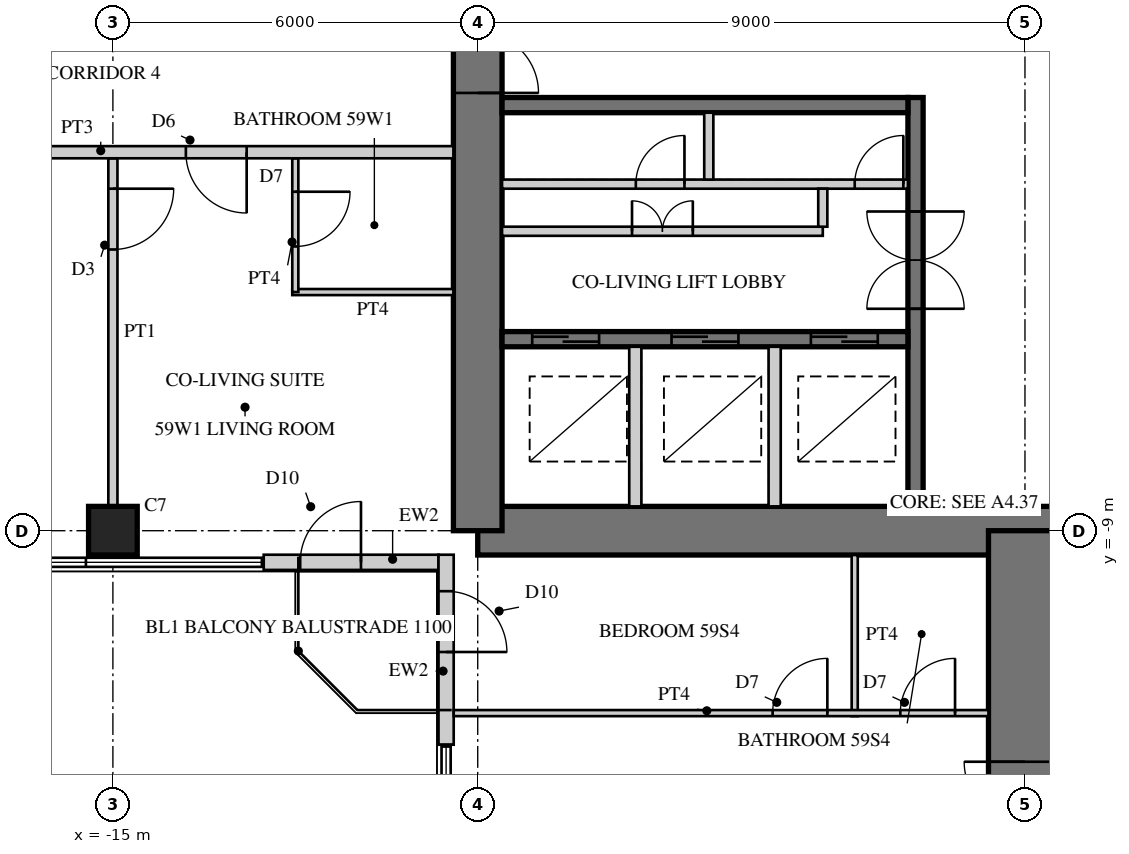
"""IFC4 building model, lengths in metres.
Left out: names, types, materials, properties, quantities, classifications, styles, units other than length and angle.
Written with IfcOpenShell. Run it as: python <this file> out.ifc"""

import sys

from ifc_helpers import new_model, si_unit, direction, frame, frame_2d, origin, origin_2d, place, context, subcontext, project, spatial, rectangle, hollow_rectangle, extrude, element, fill, save


model = new_model("IFC4")
c1 = context("Model", 3, precision=1e-05, world=origin(), true_north=direction((0.0, 1.0)))
c2 = subcontext(c1, "Body", "Model", "MODEL_VIEW")
j1 = project(units=[si_unit("LENGTHUNIT", "METRE"), si_unit("PLANEANGLEUNIT", "RADIAN")], contexts=[c1])
p1 = place(None, origin())
s1 = spatial("IfcSite", under=j1, at=p1, CompositionType="ELEMENT")
p2 = place(p1, origin())
s2 = spatial("IfcBuilding", under=s1, at=p2, CompositionType="ELEMENT")
p3 = place(p2, frame((0.0, 0.0, 232.3)))
s3 = spatial("IfcBuildingStorey", under=s2, at=p3, CompositionType="ELEMENT", Elevation=232.3)
p4 = place(p3, frame((-9.0, -9.0, 0.0), z_axis=(0.0, 0.0, 1.0), x_axis=(1.0, 0.0, 0.0)))
e1 = element("IfcWall", 1, at=p4, inside=s3, PredefinedType="SHEAR", context=c2, shape_type="SweptSolid", body=[
    extrude(rectangle(XDim=18.0, YDim=0.8, at=frame_2d((9.0, 0.0))), origin(), (0.0, 0.0, 1.0), 3.4),
])
p5 = place(p4, frame((9.8, 0.0, 0.0)))
e2 = element("IfcOpeningElement", 2, at=p5, cuts=e1, PredefinedType="OPENING", context=c2, shape_type="SweptSolid", body=[
    extrude(rectangle(XDim=1.0, YDim=2.4, at=frame_2d((0.5, 1.2))), frame((0.0, 0.41, 0.0), z_axis=(0.0, -1.0, 0.0), x_axis=(1.0, 0.0, 0.0)), (0.0, 0.0, 1.0), 0.82),
])
p6 = place(p3, frame((-9.0, 9.0, 0.0), z_axis=(0.0, 0.0, 1.0), x_axis=(0.0, -1.0, 0.0)))
e3 = element("IfcWall", 3, at=p6, inside=s3, PredefinedType="SHEAR", context=c2, shape_type="SweptSolid", body=[
    extrude(rectangle(XDim=18.0, YDim=0.8, at=frame_2d((9.0, 0.0))), origin(), (0.0, 0.0, 1.0), 3.4),
])
p7 = place(p6, frame((9.8, 0.0, 0.0)))
e4 = element("IfcOpeningElement", 4, at=p7, cuts=e3, PredefinedType="OPENING", context=c2, shape_type="SweptSolid", body=[
    extrude(rectangle(XDim=1.0, YDim=2.4, at=frame_2d((0.5, 1.2))), frame((0.0, 0.41, 0.0), z_axis=(0.0, -1.0, 0.0), x_axis=(1.0, 0.0, 0.0)), (0.0, 0.0, 1.0), 0.82),
])
p8 = place(p3, frame((-1.8, -1.875, 0.0), z_axis=(0.0, 0.0, 1.0), x_axis=(0.0, -1.0, 0.0)))
e5 = element("IfcWall", 5, at=p8, inside=s3, PredefinedType="SHEAR", context=c2, shape_type="SweptSolid", body=[
    extrude(rectangle(XDim=6.725, YDim=0.25, at=frame_2d((3.363, 0.0))), origin(), (0.0, 0.0, 1.0), 3.4),
])
p9 = place(p8, frame((1.875, 0.0, 0.0)))
e6 = element("IfcOpeningElement", 6, at=p9, cuts=e5, PredefinedType="OPENING", context=c2, shape_type="SweptSolid", body=[
    extrude(rectangle(XDim=1.6, YDim=2.4, at=frame_2d((0.8, 1.2))), frame((0.0, 0.135, 0.0), z_axis=(0.0, -1.0, 0.0), x_axis=(1.0, 0.0, 0.0)), (0.0, 0.0, 1.0), 0.27),
])
p10 = place(p3, frame((-1.925, -2.0, 0.0), z_axis=(0.0, 0.0, 1.0), x_axis=(-1.0, 0.0, 0.0)))
e7 = element("IfcWall", 7, at=p10, inside=s3, PredefinedType="SHEAR", context=c2, shape_type="SweptSolid", body=[
    extrude(rectangle(XDim=6.675, YDim=0.25, at=frame_2d((3.337, 0.0))), origin(), (0.0, 0.0, 1.0), 3.4),
])
p11 = place(p3, frame((-1.925, -5.85, 0.0), z_axis=(0.0, 0.0, 1.0), x_axis=(-1.0, 0.0, 0.0)))
e8 = element("IfcWall", 8, at=p11, inside=s3, PredefinedType="SHEAR", context=c2, shape_type="SweptSolid", body=[
    extrude(rectangle(XDim=6.675, YDim=0.25, at=frame_2d((3.337, 0.0))), origin(), (0.0, 0.0, 1.0), 3.4),
])
p12 = place(p11, frame((0.496, 0.0, 0.0)))
e9 = element("IfcOpeningElement", 9, at=p12, cuts=e8, PredefinedType="OPENING", context=c2, shape_type="SweptSolid", body=[
    extrude(rectangle(XDim=1.1, YDim=2.2, at=frame_2d((0.55, 1.1))), frame((0.0, 0.135, 0.0), z_axis=(0.0, -1.0, 0.0), x_axis=(1.0, 0.0, 0.0)), (0.0, 0.0, 1.0), 0.27),
])
p13 = place(p11, frame((2.788, 0.0, 0.0)))
e10 = element("IfcOpeningElement", 10, at=p13, cuts=e8, PredefinedType="OPENING", context=c2, shape_type="SweptSolid", body=[
    extrude(rectangle(XDim=1.1, YDim=2.2, at=frame_2d((0.55, 1.1))), frame((0.0, 0.135, 0.0), z_axis=(0.0, -1.0, 0.0), x_axis=(1.0, 0.0, 0.0)), (0.0, 0.0, 1.0), 0.27),
])
p14 = place(p11, frame((5.079, 0.0, 0.0)))
e11 = element("IfcOpeningElement", 11, at=p14, cuts=e8, PredefinedType="OPENING", context=c2, shape_type="SweptSolid", body=[
    extrude(rectangle(XDim=1.1, YDim=2.2, at=frame_2d((0.55, 1.1))), frame((0.0, 0.135, 0.0), z_axis=(0.0, -1.0, 0.0), x_axis=(1.0, 0.0, 0.0)), (0.0, 0.0, 1.0), 0.27),
])
p15 = place(p3, frame((-1.925, -3.3, 0.0), z_axis=(0.0, 0.0, 1.0), x_axis=(-1.0, 0.0, 0.0)))
e12 = element("IfcWall", 12, at=p15, inside=s3, PredefinedType="PARTITIONING", context=c2, shape_type="SweptSolid", body=[
    extrude(rectangle(XDim=6.675, YDim=0.15, at=frame_2d((3.337, 0.0))), origin(), (0.0, 0.0, 1.0), 3.4),
])
p16 = place(p15, frame((0.075, 0.0, 0.0)))
e13 = element("IfcOpeningElement", 13, at=p16, cuts=e12, PredefinedType="OPENING", context=c2, shape_type="SweptSolid", body=[
    extrude(rectangle(XDim=0.8, YDim=2.1, at=frame_2d((0.4, 1.05))), frame((0.0, 0.085, 0.0), z_axis=(0.0, -1.0, 0.0), x_axis=(1.0, 0.0, 0.0)), (0.0, 0.0, 1.0), 0.17),
])
p17 = place(p15, frame((3.675, 0.0, 0.0)))
e14 = element("IfcOpeningElement", 14, at=p17, cuts=e12, PredefinedType="OPENING", context=c2, shape_type="SweptSolid", body=[
    extrude(rectangle(XDim=0.8, YDim=2.1, at=frame_2d((0.4, 1.05))), frame((0.0, 0.085, 0.0), z_axis=(0.0, -1.0, 0.0), x_axis=(1.0, 0.0, 0.0)), (0.0, 0.0, 1.0), 0.17),
])
p18 = place(p3, frame((-5.2, -2.125, 0.0), z_axis=(0.0, 0.0, 1.0), x_axis=(0.0, -1.0, 0.0)))
e15 = element("IfcWall", 15, at=p18, inside=s3, PredefinedType="PARTITIONING", context=c2, shape_type="SweptSolid", body=[
    extrude(rectangle(XDim=1.1, YDim=0.15, at=frame_2d((0.55, 0.0))), origin(), (0.0, 0.0, 1.0), 3.4),
])
for number, where, z_axis, x_axis in (
    (16, (-4.117, -5.975, 0.0), (0.0, 0.0, 1.0), (0.0, -1.0, 0.0)),
    (17, (-6.408, -5.975, 0.0), (0.0, 0.0, 1.0), (0.0, -1.0, 0.0)),
):
    element("IfcWall", number, at=place(p3, frame(where, z_axis=z_axis, x_axis=x_axis)), inside=s3, PredefinedType="PARTITIONING", context=c2, shape_type="SweptSolid", body=[
        extrude(rectangle(XDim=2.625, YDim=0.2, at=frame_2d((1.312, 0.0))), origin(), (0.0, 0.0, 1.0), 3.4),
    ])
p19 = place(p3, frame((0.0, -9.0, 0.0), z_axis=(0.0, 0.0, 1.0), x_axis=(0.0, -1.0, 0.0)))
e18 = element("IfcWall", 18, at=p19, inside=s3, PredefinedType="SHEAR", context=c2, shape_type="SweptSolid", body=[
    extrude(rectangle(XDim=9.0, YDim=1.2, at=frame_2d((4.5, 0.0))), origin(), (0.0, 0.0, 1.0), 3.4),
])
p20 = place(p19, frame((3.8, 0.0, 0.0)))
e19 = element("IfcOpeningElement", 19, at=p20, cuts=e18, PredefinedType="OPENING", context=c2, shape_type="SweptSolid", body=[
    extrude(rectangle(XDim=1.0, YDim=2.15, at=frame_2d((0.5, 1.075))), frame((0.0, 0.61, 0.0), z_axis=(0.0, -1.0, 0.0), x_axis=(1.0, 0.0, 0.0)), (0.0, 0.0, 1.0), 1.22),
])
p21 = place(p19, frame((7.0, 0.0, 0.0)))
e20 = element("IfcOpeningElement", 20, at=p21, cuts=e18, PredefinedType="OPENING", context=c2, shape_type="SweptSolid", body=[
    extrude(rectangle(XDim=1.0, YDim=2.2, at=frame_2d((0.5, 1.1))), frame((0.0, 0.61, 0.0), z_axis=(0.0, -1.0, 0.0), x_axis=(1.0, 0.0, 0.0)), (0.0, 0.0, 1.0), 1.22),
])
p22 = place(p3, frame((-15.0, -9.0, 0.0), z_axis=(0.0, 0.0, 1.0), x_axis=(1.0, 0.0, 0.0)))
e21 = element("IfcColumn", 21, at=p22, inside=s3, PredefinedType="COLUMN", context=c2, shape_type="SweptSolid", body=[
    extrude(rectangle(XDim=0.8, YDim=0.8, at=origin_2d()), origin(), (0.0, 0.0, 1.0), 3.4),
])
p23 = place(p3, frame((-12.52, -9.52, 0.0), z_axis=(0.0, 0.0, 1.0), x_axis=(1.0, 0.0, 0.0)))
e22 = element("IfcWall", 22, at=p23, inside=s3, PredefinedType="SOLIDWALL", context=c2, shape_type="SweptSolid", body=[
    extrude(rectangle(XDim=2.875, YDim=0.25, at=frame_2d((1.438, 0.0))), origin(), (0.0, 0.0, 1.0), 3.22),
])
p24 = place(p23, frame((0.6, 0.0, 0.0)))
e23 = element("IfcOpeningElement", 23, at=p24, cuts=e22, PredefinedType="OPENING", context=c2, shape_type="SweptSolid", body=[
    extrude(rectangle(XDim=1.0, YDim=2.2, at=frame_2d((0.5, 1.1))), frame((0.0, 0.135, 0.0), z_axis=(0.0, -1.0, 0.0), x_axis=(1.0, 0.0, 0.0)), (0.0, 0.0, 1.0), 0.27),
])
p25 = place(p3, frame((-9.52, -9.395, 0.0), z_axis=(0.0, 0.0, 1.0), x_axis=(0.0, -1.0, 0.0)))
e24 = element("IfcWall", 24, at=p25, inside=s3, PredefinedType="SOLIDWALL", context=c2, shape_type="SweptSolid", body=[
    extrude(rectangle(XDim=3.125, YDim=0.25, at=frame_2d((1.562, 0.0))), origin(), (0.0, 0.0, 1.0), 3.22),
])
p26 = place(p25, frame((0.6, 0.0, 0.0)))
e25 = element("IfcOpeningElement", 25, at=p26, cuts=e24, PredefinedType="OPENING", context=c2, shape_type="SweptSolid", body=[
    extrude(rectangle(XDim=1.0, YDim=2.2, at=frame_2d((0.5, 1.1))), frame((0.0, 0.135, 0.0), z_axis=(0.0, -1.0, 0.0), x_axis=(1.0, 0.0, 0.0)), (0.0, 0.0, 1.0), 0.27),
])
p27 = place(p3, frame((-3.325, -4.075, 0.0), z_axis=(0.0, 0.0, 1.0), x_axis=(-1.0, 0.0, 0.0)))
e26 = element("IfcWall", 26, at=p27, inside=s3, PredefinedType="PARTITIONING", context=c2, shape_type="SweptSolid", body=[
    extrude(rectangle(XDim=5.275, YDim=0.15, at=frame_2d((2.638, 0.0))), origin(), (0.0, 0.0, 1.0), 3.22),
])
p28 = place(p27, frame((2.137, 0.0, 0.0)))
e27 = element("IfcOpeningElement", 27, at=p28, cuts=e26, PredefinedType="OPENING", context=c2, shape_type="SweptSolid", body=[
    extrude(rectangle(XDim=1.0, YDim=2.1, at=frame_2d((0.5, 1.05))), frame((0.0, 0.085, 0.0), z_axis=(0.0, -1.0, 0.0), x_axis=(1.0, 0.0, 0.0)), (0.0, 0.0, 1.0), 0.17),
])
p29 = place(p3, frame((-3.325, -3.375, 0.0), z_axis=(0.0, 0.0, 1.0), x_axis=(0.0, -1.0, 0.0)))
e28 = element("IfcWall", 28, at=p29, inside=s3, PredefinedType="PARTITIONING", context=c2, shape_type="SweptSolid", body=[
    extrude(rectangle(XDim=0.625, YDim=0.15, at=frame_2d((0.312, 0.0))), origin(), (0.0, 0.0, 1.0), 3.22),
])
p30 = place(p3, frame((-2.8, -9.4, 0.0), z_axis=(0.0, 0.0, 1.0), x_axis=(0.0, -1.0, 0.0)))
e29 = element("IfcWall", 29, at=p30, inside=s3, PredefinedType="PARTITIONING", context=c2, shape_type="SweptSolid", body=[
    extrude(rectangle(XDim=2.65, YDim=0.1, at=frame_2d((1.325, 0.0))), origin(), (0.0, 0.0, 1.0), 3.22),
])
p31 = place(p3, frame((-9.395, -12.0, 0.0), z_axis=(0.0, 0.0, 1.0), x_axis=(1.0, 0.0, 0.0)))
e30 = element("IfcWall", 30, at=p31, inside=s3, PredefinedType="PARTITIONING", context=c2, shape_type="SweptSolid", body=[
    extrude(rectangle(XDim=8.795, YDim=0.1, at=frame_2d((4.397, 0.0))), origin(), (0.0, 0.0, 1.0), 3.22),
])
p32 = place(p31, frame((5.245, 0.0, 0.0)))
e31 = element("IfcOpeningElement", 31, at=p32, cuts=e30, PredefinedType="OPENING", context=c2, shape_type="SweptSolid", body=[
    extrude(rectangle(XDim=0.9, YDim=2.1, at=frame_2d((0.45, 1.05))), frame((0.0, 0.06, 0.0), z_axis=(0.0, -1.0, 0.0), x_axis=(1.0, 0.0, 0.0)), (0.0, 0.0, 1.0), 0.12),
])
p33 = place(p31, frame((7.345, 0.0, 0.0)))
e32 = element("IfcOpeningElement", 32, at=p33, cuts=e30, PredefinedType="OPENING", context=c2, shape_type="SweptSolid", body=[
    extrude(rectangle(XDim=0.9, YDim=2.1, at=frame_2d((0.45, 1.05))), frame((0.0, 0.06, 0.0), z_axis=(0.0, -1.0, 0.0), x_axis=(1.0, 0.0, 0.0)), (0.0, 0.0, 1.0), 0.12),
])
p34 = place(p3, frame((-9.4, -5.075, 0.0), z_axis=(0.0, 0.0, 1.0), x_axis=(-1.0, 0.0, 0.0)))
e33 = element("IfcWall", 33, at=p34, inside=s3, PredefinedType="PARTITIONING", context=c2, shape_type="SweptSolid", body=[
    extrude(rectangle(XDim=2.65, YDim=0.1, at=frame_2d((1.325, 0.0))), origin(), (0.0, 0.0, 1.0), 3.22),
])
p35 = place(p3, frame((-12.0, -2.875, 0.0), z_axis=(0.0, 0.0, 1.0), x_axis=(0.0, -1.0, 0.0)))
e34 = element("IfcWall", 34, at=p35, inside=s3, PredefinedType="PARTITIONING", context=c2, shape_type="SweptSolid", body=[
    extrude(rectangle(XDim=2.2, YDim=0.1, at=frame_2d((1.1, 0.0))), origin(), (0.0, 0.0, 1.0), 3.22),
])
p36 = place(p35, frame((0.55, 0.0, 0.0)))
e35 = element("IfcOpeningElement", 35, at=p36, cuts=e34, PredefinedType="OPENING", context=c2, shape_type="SweptSolid", body=[
    extrude(rectangle(XDim=0.9, YDim=2.1, at=frame_2d((0.45, 1.05))), frame((0.0, 0.06, 0.0), z_axis=(0.0, -1.0, 0.0), x_axis=(1.0, 0.0, 0.0)), (0.0, 0.0, 1.0), 0.12),
])
p37 = place(p3, frame((-15.0, -2.875, 0.0), z_axis=(0.0, 0.0, 1.0), x_axis=(0.0, -1.0, 0.0)))
e36 = element("IfcWall", 36, at=p37, inside=s3, PredefinedType="PARTITIONING", context=c2, shape_type="SweptSolid", body=[
    extrude(rectangle(XDim=5.725, YDim=0.15, at=frame_2d((2.863, 0.0))), origin(), (0.0, 0.0, 1.0), 2.52),
])
p38 = place(p37, frame((0.5, 0.0, 0.0)))
e37 = element("IfcOpeningElement", 37, at=p38, cuts=e36, PredefinedType="OPENING", context=c2, shape_type="SweptSolid", body=[
    extrude(rectangle(XDim=1.0, YDim=2.1, at=frame_2d((0.5, 1.05))), frame((0.0, 0.085, 0.0), z_axis=(0.0, -1.0, 0.0), x_axis=(1.0, 0.0, 0.0)), (0.0, 0.0, 1.0), 0.17),
])
p39 = place(p3, frame((-9.4, -2.775, 0.0), z_axis=(0.0, 0.0, 1.0), x_axis=(-1.0, 0.0, 0.0)))
e38 = element("IfcWall", 38, at=p39, inside=s3, PredefinedType="SOLIDWALL", context=c2, shape_type="SweptSolid", body=[
    extrude(rectangle(XDim=11.6, YDim=0.2, at=frame_2d((5.8, 0.0))), origin(), (0.0, 0.0, 1.0), 3.22),
])
p40 = place(p39, frame((3.4, 0.0, 0.0)))
e39 = element("IfcOpeningElement", 39, at=p40, cuts=e38, PredefinedType="OPENING", context=c2, shape_type="SweptSolid", body=[
    extrude(rectangle(XDim=1.0, YDim=2.15, at=frame_2d((0.5, 1.075))), frame((0.0, 0.11, 0.0), z_axis=(0.0, -1.0, 0.0), x_axis=(1.0, 0.0, 0.0)), (0.0, 0.0, 1.0), 0.22),
])
p41 = place(p24, origin())
e40 = element("IfcDoor", 40, at=p41, inside=s3, OperationType="SINGLE_SWING_RIGHT", PredefinedType="DOOR", context=c2, shape_type="SweptSolid", body=[
    extrude(hollow_rectangle(XDim=1.0, YDim=2.2, WallThickness=0.06, at=frame_2d((0.5, 1.1))), frame((0.0, 0.025, 0.0), z_axis=(0.0, -1.0, 0.0), x_axis=(1.0, 0.0, 0.0)), (0.0, 0.0, 1.0), 0.05),
    extrude(rectangle(XDim=0.879, YDim=2.079, at=frame_2d((0.5, 1.1))), frame((0.0, 0.025, 0.0), z_axis=(0.0, -1.0, 0.0), x_axis=(1.0, 0.0, 0.0)), (0.0, 0.0, 1.0), 0.05),
])
fill(e23, e40)
p42 = place(p26, origin())
e41 = element("IfcDoor", 41, at=p42, inside=s3, OperationType="SINGLE_SWING_RIGHT", PredefinedType="DOOR", context=c2, shape_type="SweptSolid", body=[
    extrude(hollow_rectangle(XDim=1.0, YDim=2.2, WallThickness=0.06, at=frame_2d((0.5, 1.1))), frame((0.0, 0.025, 0.0), z_axis=(0.0, -1.0, 0.0), x_axis=(1.0, 0.0, 0.0)), (0.0, 0.0, 1.0), 0.05),
    extrude(rectangle(XDim=0.879, YDim=2.079, at=frame_2d((0.5, 1.1))), frame((0.0, 0.025, 0.0), z_axis=(0.0, -1.0, 0.0), x_axis=(1.0, 0.0, 0.0)), (0.0, 0.0, 1.0), 0.05),
])
fill(e25, e41)
p43 = place(p28, frame((1.0, 0.0, 0.0), z_axis=(0.0, 0.0, 1.0), x_axis=(-1.0, 0.0, 0.0)))
e42 = element("IfcDoor", 42, at=p43, inside=s3, OperationType="DOUBLE_DOOR_SINGLE_SWING", PredefinedType="DOOR", context=c2, shape_type="SweptSolid", body=[
    extrude(rectangle(XDim=1.0, YDim=2.1, at=frame_2d((0.5, 1.05))), frame((0.0, 0.025, 0.0), z_axis=(0.0, -1.0, 0.0), x_axis=(1.0, 0.0, 0.0)), (0.0, 0.0, 1.0), 0.05),
])
fill(e27, e42)
p44 = place(p32, origin())
e43 = element("IfcDoor", 43, at=p44, inside=s3, OperationType="SINGLE_SWING_RIGHT", PredefinedType="DOOR", context=c2, shape_type="SweptSolid", body=[
    extrude(rectangle(XDim=0.9, YDim=2.1, at=frame_2d((0.45, 1.05))), frame((0.0, 0.025, 0.0), z_axis=(0.0, -1.0, 0.0), x_axis=(1.0, 0.0, 0.0)), (0.0, 0.0, 1.0), 0.05),
])
fill(e31, e43)
p45 = place(p33, origin())
e44 = element("IfcDoor", 44, at=p45, inside=s3, OperationType="SINGLE_SWING_RIGHT", PredefinedType="DOOR", context=c2, shape_type="SweptSolid", body=[
    extrude(rectangle(XDim=0.9, YDim=2.1, at=frame_2d((0.45, 1.05))), frame((0.0, 0.025, 0.0), z_axis=(0.0, -1.0, 0.0), x_axis=(1.0, 0.0, 0.0)), (0.0, 0.0, 1.0), 0.05),
])
fill(e32, e44)
p46 = place(p36, origin())
e45 = element("IfcDoor", 45, at=p46, inside=s3, OperationType="SINGLE_SWING_LEFT", PredefinedType="DOOR", context=c2, shape_type="SweptSolid", body=[
    extrude(rectangle(XDim=0.9, YDim=2.1, at=frame_2d((0.45, 1.05))), frame((0.0, 0.025, 0.0), z_axis=(0.0, -1.0, 0.0), x_axis=(1.0, 0.0, 0.0)), (0.0, 0.0, 1.0), 0.05),
])
fill(e35, e45)
p47 = place(p38, origin())
e46 = element("IfcDoor", 46, at=p47, inside=s3, OperationType="SINGLE_SWING_LEFT", PredefinedType="DOOR", context=c2, shape_type="SweptSolid", body=[
    extrude(rectangle(XDim=1.0, YDim=2.1, at=frame_2d((0.5, 1.05))), frame((0.0, 0.025, 0.0), z_axis=(0.0, -1.0, 0.0), x_axis=(1.0, 0.0, 0.0)), (0.0, 0.0, 1.0), 0.05),
])
fill(e37, e46)
p48 = place(p40, origin())
e47 = element("IfcDoor", 47, at=p48, inside=s3, OperationType="SINGLE_SWING_LEFT", PredefinedType="DOOR", context=c2, shape_type="SweptSolid", body=[
    extrude(rectangle(XDim=1.0, YDim=2.15, at=frame_2d((0.5, 1.075))), frame((0.0, 0.025, 0.0), z_axis=(0.0, -1.0, 0.0), x_axis=(1.0, 0.0, 0.0)), (0.0, 0.0, 1.0), 0.05),
])
fill(e39, e47)
p49 = place(p20, frame((1.0, 0.0, 0.0), z_axis=(0.0, 0.0, 1.0), x_axis=(-1.0, 0.0, 0.0)))
e48 = element("IfcDoor", 48, at=p49, inside=s3, OperationType="SINGLE_SWING_RIGHT", PredefinedType="DOOR", context=c2, shape_type="SweptSolid", body=[
    extrude(rectangle(XDim=1.0, YDim=2.15, at=frame_2d((0.5, 1.075))), frame((0.0, 0.025, 0.0), z_axis=(0.0, -1.0, 0.0), x_axis=(1.0, 0.0, 0.0)), (0.0, 0.0, 1.0), 0.05),
])
fill(e19, e48)
p50 = place(p7, origin())
e49 = element("IfcDoor", 49, at=p50, inside=s3, OperationType="SINGLE_SWING_RIGHT", PredefinedType="DOOR", context=c2, shape_type="SweptSolid", body=[
    extrude(rectangle(XDim=1.0, YDim=2.4, at=frame_2d((0.5, 1.2))), frame((0.0, 0.055, 0.0), z_axis=(0.0, -1.0, 0.0), x_axis=(1.0, 0.0, 0.0)), (0.0, 0.0, 1.0), 0.05),
])
fill(e4, e49)
p51 = place(p12, origin())
e50 = element("IfcDoor", 50, at=p51, inside=s3, OperationType="DOUBLE_DOOR_SLIDING", PredefinedType="DOOR", context=c2, shape_type="SweptSolid", body=[
    extrude(rectangle(XDim=1.1, YDim=2.2, at=frame_2d((0.55, 1.1))), frame((0.0, 0.025, 0.0), z_axis=(0.0, -1.0, 0.0), x_axis=(1.0, 0.0, 0.0)), (0.0, 0.0, 1.0), 0.05),
])
fill(e9, e50)
p52 = place(p13, origin())
e51 = element("IfcDoor", 51, at=p52, inside=s3, OperationType="DOUBLE_DOOR_SLIDING", PredefinedType="DOOR", context=c2, shape_type="SweptSolid", body=[
    extrude(rectangle(XDim=1.1, YDim=2.2, at=frame_2d((0.55, 1.1))), frame((0.0, 0.025, 0.0), z_axis=(0.0, -1.0, 0.0), x_axis=(1.0, 0.0, 0.0)), (0.0, 0.0, 1.0), 0.05),
])
fill(e10, e51)
p53 = place(p14, origin())
e52 = element("IfcDoor", 52, at=p53, inside=s3, OperationType="DOUBLE_DOOR_SLIDING", PredefinedType="DOOR", context=c2, shape_type="SweptSolid", body=[
    extrude(rectangle(XDim=1.1, YDim=2.2, at=frame_2d((0.55, 1.1))), frame((0.0, 0.025, 0.0), z_axis=(0.0, -1.0, 0.0), x_axis=(1.0, 0.0, 0.0)), (0.0, 0.0, 1.0), 0.05),
])
fill(e11, e52)
p54 = place(p9, origin())
e53 = element("IfcDoor", 53, at=p54, inside=s3, OperationType="DOUBLE_DOOR_DOUBLE_SWING", PredefinedType="DOOR", context=c2, shape_type="SweptSolid", body=[
    extrude(rectangle(XDim=1.6, YDim=2.4, at=frame_2d((0.8, 1.2))), frame((0.0, 0.025, 0.0), z_axis=(0.0, -1.0, 0.0), x_axis=(1.0, 0.0, 0.0)), (0.0, 0.0, 1.0), 0.05),
])
fill(e6, e53)
p55 = place(p16, frame((0.8, 0.0, 0.0), z_axis=(0.0, 0.0, 1.0), x_axis=(-1.0, 0.0, 0.0)))
e54 = element("IfcDoor", 54, at=p55, inside=s3, OperationType="SINGLE_SWING_RIGHT", PredefinedType="DOOR", context=c2, shape_type="SweptSolid", body=[
    extrude(rectangle(XDim=0.8, YDim=2.1, at=frame_2d((0.4, 1.05))), frame((0.0, 0.025, 0.0), z_axis=(0.0, -1.0, 0.0), x_axis=(1.0, 0.0, 0.0)), (0.0, 0.0, 1.0), 0.05),
])
fill(e13, e54)
p56 = place(p17, frame((0.8, 0.0, 0.0), z_axis=(0.0, 0.0, 1.0), x_axis=(-1.0, 0.0, 0.0)))
e55 = element("IfcDoor", 55, at=p56, inside=s3, OperationType="SINGLE_SWING_RIGHT", PredefinedType="DOOR", context=c2, shape_type="SweptSolid", body=[
    extrude(rectangle(XDim=0.8, YDim=2.1, at=frame_2d((0.4, 1.05))), frame((0.0, 0.025, 0.0), z_axis=(0.0, -1.0, 0.0), x_axis=(1.0, 0.0, 0.0)), (0.0, 0.0, 1.0), 0.05),
])
fill(e14, e55)
save(model, sys.argv[1])
